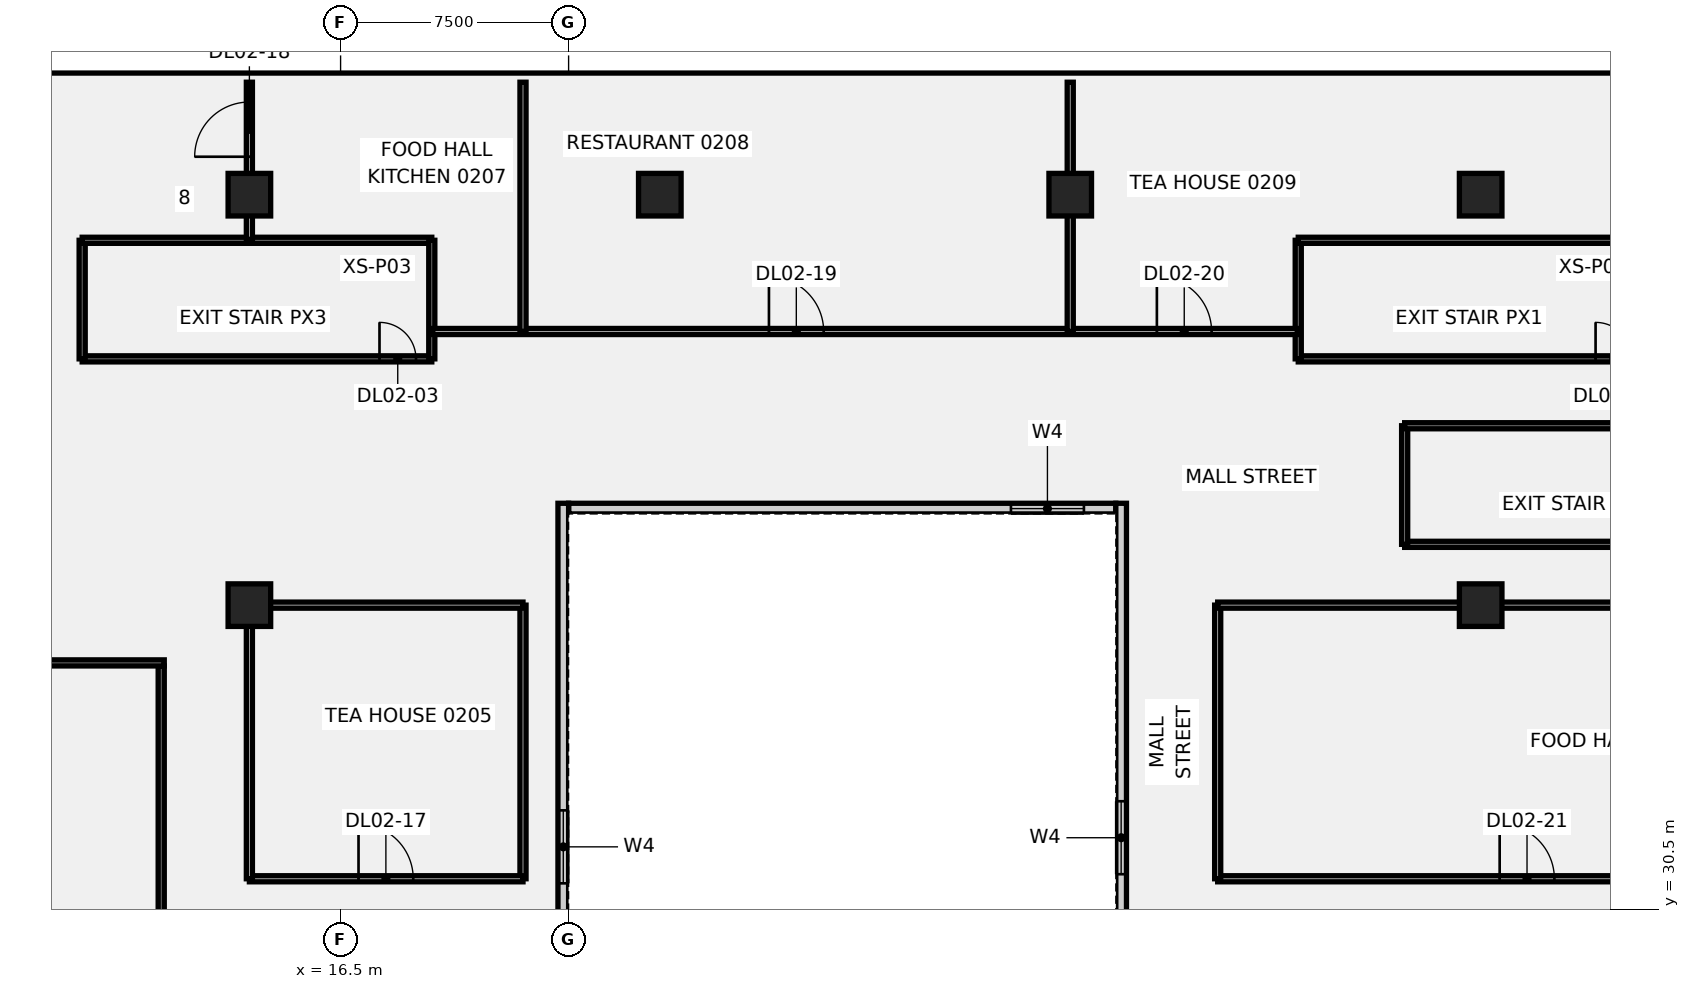
"""IFC4 building model, lengths in metres.
Left out: names, types, materials, properties, quantities, classifications, styles, units other than length and angle.
Written with IfcOpenShell. Run it as: python <this file> out.ifc"""

import sys

from ifc_helpers import new_model, si_unit, direction, frame, frame_2d, origin, origin_2d, place, context, subcontext, project, spatial, rectangle, extrude, element, fill, save


model = new_model("IFC4")
c1 = context("Model", 3, precision=1e-05, world=origin(), true_north=direction((0.0, 1.0)))
c2 = subcontext(c1, "Body", "Model", "MODEL_VIEW")
j1 = project(units=[si_unit("LENGTHUNIT", "METRE"), si_unit("PLANEANGLEUNIT", "RADIAN")], contexts=[c1])
p1 = place(None, origin())
s1 = spatial("IfcSite", under=j1, at=p1, CompositionType="ELEMENT")
p2 = place(p1, origin())
s2 = spatial("IfcBuilding", under=s1, at=p2, CompositionType="ELEMENT")
p3 = place(p2, frame((0.0, 0.0, 15.0)))
s3 = spatial("IfcBuildingStorey", under=s2, at=p3, CompositionType="ELEMENT", Elevation=15.0)
for number, where, z_axis, x_axis in (
    (1, (13.5, 40.5, -0.5), (0.0, 0.0, 1.0), (1.0, 0.0, 0.0)),
    (2, (13.5, 54.0, -0.5), (0.0, 0.0, 1.0), (1.0, 0.0, 0.0)),
    (3, (27.0, 54.0, -0.5), (0.0, 0.0, 1.0), (1.0, 0.0, 0.0)),
    (4, (40.5, 54.0, -0.5), (0.0, 0.0, 1.0), (1.0, 0.0, 0.0)),
    (5, (54.0, 40.5, -0.5), (0.0, 0.0, 1.0), (1.0, 0.0, 0.0)),
    (6, (54.0, 54.0, -0.5), (0.0, 0.0, 1.0), (1.0, 0.0, 0.0)),
):
    element("IfcColumn", number, at=place(p3, frame(where, z_axis=z_axis, x_axis=x_axis)), inside=s3, PredefinedType="COLUMN", context=c2, shape_type="SweptSolid", body=[
        extrude(rectangle(XDim=1.4, YDim=1.4, at=origin_2d()), origin(), (0.0, 0.0, 1.0), 5.0),
    ])
p4 = place(p3, frame((8.0, 48.6, 0.0), z_axis=(0.0, 0.0, 1.0), x_axis=(1.0, 0.0, 0.0)))
e7 = element("IfcWall", 7, at=p4, inside=s3, PredefinedType="PARTITIONING", context=c2, shape_type="SweptSolid", body=[
    extrude(rectangle(XDim=11.5, YDim=0.2, at=frame_2d((5.75, 0.0))), origin(), (0.0, 0.0, 1.0), 4.5),
])
p5 = place(p4, frame((9.78, 0.0, 0.0)))
e8 = element("IfcOpeningElement", 8, at=p5, cuts=e7, PredefinedType="OPENING", context=c2, shape_type="SweptSolid", body=[
    extrude(rectangle(XDim=1.2, YDim=2.1, at=frame_2d((0.6, 1.05))), frame((0.0, 0.11, 0.0), z_axis=(0.0, -1.0, 0.0), x_axis=(1.0, 0.0, 0.0)), (0.0, 0.0, 1.0), 0.22),
])
p6 = place(p3, frame((8.0, 48.6, 0.0), z_axis=(0.0, 0.0, 1.0), x_axis=(0.0, 1.0, 0.0)))
e9 = element("IfcWall", 9, at=p6, inside=s3, PredefinedType="PARTITIONING", context=c2, shape_type="SweptSolid", body=[
    extrude(rectangle(XDim=3.9, YDim=0.2, at=frame_2d((1.95, 0.0))), origin(), (0.0, 0.0, 1.0), 4.5),
])
p7 = place(p3, frame((8.0, 52.5, 0.0), z_axis=(0.0, 0.0, 1.0), x_axis=(1.0, 0.0, 0.0)))
e10 = element("IfcWall", 10, at=p7, inside=s3, PredefinedType="PARTITIONING", context=c2, shape_type="SweptSolid", body=[
    extrude(rectangle(XDim=11.5, YDim=0.2, at=frame_2d((5.75, 0.0))), origin(), (0.0, 0.0, 1.0), 4.5),
])
p8 = place(p3, frame((19.5, 48.6, 0.0), z_axis=(0.0, 0.0, 1.0), x_axis=(0.0, 1.0, 0.0)))
e11 = element("IfcWall", 11, at=p8, inside=s3, PredefinedType="PARTITIONING", context=c2, shape_type="SweptSolid", body=[
    extrude(rectangle(XDim=3.9, YDim=0.2, at=frame_2d((1.95, 0.0))), origin(), (0.0, 0.0, 1.0), 4.5),
])
p9 = place(p3, frame((48.0, 48.6, 0.0), z_axis=(0.0, 0.0, 1.0), x_axis=(1.0, 0.0, 0.0)))
e12 = element("IfcWall", 12, at=p9, inside=s3, PredefinedType="PARTITIONING", context=c2, shape_type="SweptSolid", body=[
    extrude(rectangle(XDim=11.5, YDim=0.2, at=frame_2d((5.75, 0.0))), origin(), (0.0, 0.0, 1.0), 4.5),
])
p10 = place(p9, frame((9.78, 0.0, 0.0)))
e13 = element("IfcOpeningElement", 13, at=p10, cuts=e12, PredefinedType="OPENING", context=c2, shape_type="SweptSolid", body=[
    extrude(rectangle(XDim=1.2, YDim=2.1, at=frame_2d((0.6, 1.05))), frame((0.0, 0.11, 0.0), z_axis=(0.0, -1.0, 0.0), x_axis=(1.0, 0.0, 0.0)), (0.0, 0.0, 1.0), 0.22),
])
p11 = place(p3, frame((48.0, 48.6, 0.0), z_axis=(0.0, 0.0, 1.0), x_axis=(0.0, 1.0, 0.0)))
e14 = element("IfcWall", 14, at=p11, inside=s3, PredefinedType="PARTITIONING", context=c2, shape_type="SweptSolid", body=[
    extrude(rectangle(XDim=3.9, YDim=0.2, at=frame_2d((1.95, 0.0))), origin(), (0.0, 0.0, 1.0), 4.5),
])
for number, where, z_axis, x_axis in (
    (15, (48.0, 52.5, 0.0), (0.0, 0.0, 1.0), (1.0, 0.0, 0.0)),
    (16, (51.5, 42.5, 0.0), (0.0, 0.0, 1.0), (1.0, 0.0, 0.0)),
):
    element("IfcWall", number, at=place(p3, frame(where, z_axis=z_axis, x_axis=x_axis)), inside=s3, PredefinedType="PARTITIONING", context=c2, shape_type="SweptSolid", body=[
        extrude(rectangle(XDim=11.5, YDim=0.2, at=frame_2d((5.75, 0.0))), origin(), (0.0, 0.0, 1.0), 4.5),
    ])
p12 = place(p3, frame((51.5, 42.5, 0.0), z_axis=(0.0, 0.0, 1.0), x_axis=(0.0, 1.0, 0.0)))
e17 = element("IfcWall", 17, at=p12, inside=s3, PredefinedType="PARTITIONING", context=c2, shape_type="SweptSolid", body=[
    extrude(rectangle(XDim=3.9, YDim=0.2, at=frame_2d((1.95, 0.0))), origin(), (0.0, 0.0, 1.0), 4.5),
])
p13 = place(p3, frame((51.5, 46.4, 0.0), z_axis=(0.0, 0.0, 1.0), x_axis=(1.0, 0.0, 0.0)))
e18 = element("IfcWall", 18, at=p13, inside=s3, PredefinedType="PARTITIONING", context=c2, shape_type="SweptSolid", body=[
    extrude(rectangle(XDim=11.5, YDim=0.2, at=frame_2d((5.75, 0.0))), origin(), (0.0, 0.0, 1.0), 4.5),
])
p14 = place(p3, frame((13.5, 52.53, 0.0), z_axis=(0.0, 0.0, 1.0), x_axis=(0.0, 1.0, 0.0)))
e19 = element("IfcWall", 19, at=p14, inside=s3, PredefinedType="PARTITIONING", context=c2, shape_type="SweptSolid", body=[
    extrude(rectangle(XDim=5.169, YDim=0.2, at=frame_2d((2.584, 0.0))), origin(), (0.0, 0.0, 1.0), 4.5),
])
p15 = place(p14, frame((2.718, 0.0, 0.0)))
e20 = element("IfcOpeningElement", 20, at=p15, cuts=e19, PredefinedType="OPENING", context=c2, shape_type="SweptSolid", body=[
    extrude(rectangle(XDim=1.8, YDim=2.1, at=frame_2d((0.9, 1.05))), frame((0.0, 0.11, 0.0), z_axis=(0.0, -1.0, 0.0), x_axis=(1.0, 0.0, 0.0)), (0.0, 0.0, 1.0), 0.22),
])
p16 = place(p3, frame((19.53, 49.5, 0.0), z_axis=(0.0, 0.0, 1.0), x_axis=(1.0, 0.0, 0.0)))
e21 = element("IfcWall", 21, at=p16, inside=s3, PredefinedType="PARTITIONING", context=c2, shape_type="SweptSolid", body=[
    extrude(rectangle(XDim=28.44, YDim=0.2, at=frame_2d((14.22, 0.0))), origin(), (0.0, 0.0, 1.0), 4.5),
])
p17 = place(p16, frame((11.06, 0.0, 0.0)))
e22 = element("IfcOpeningElement", 22, at=p17, cuts=e21, PredefinedType="OPENING", context=c2, shape_type="SweptSolid", body=[
    extrude(rectangle(XDim=1.8, YDim=2.1, at=frame_2d((0.9, 1.05))), frame((0.0, 0.11, 0.0), z_axis=(0.0, -1.0, 0.0), x_axis=(1.0, 0.0, 0.0)), (0.0, 0.0, 1.0), 0.22),
])
p18 = place(p16, frame((23.82, 0.0, 0.0)))
e23 = element("IfcOpeningElement", 23, at=p18, cuts=e21, PredefinedType="OPENING", context=c2, shape_type="SweptSolid", body=[
    extrude(rectangle(XDim=1.8, YDim=2.1, at=frame_2d((0.9, 1.05))), frame((0.0, 0.11, 0.0), z_axis=(0.0, -1.0, 0.0), x_axis=(1.0, 0.0, 0.0)), (0.0, 0.0, 1.0), 0.22),
])
for number, where, z_axis, x_axis in (
    (24, (22.5, 49.5, 0.0), (0.0, 0.0, 1.0), (0.0, 1.0, 0.0)),
    (25, (40.5, 49.5, 0.0), (0.0, 0.0, 1.0), (0.0, 1.0, 0.0)),
):
    element("IfcWall", number, at=place(p3, frame(where, z_axis=z_axis, x_axis=x_axis)), inside=s3, PredefinedType="PARTITIONING", context=c2, shape_type="SweptSolid", body=[
        extrude(rectangle(XDim=8.199, YDim=0.2, at=frame_2d((4.1, 0.0))), origin(), (0.0, 0.0, 1.0), 4.5),
    ])
p19 = place(p3, frame((45.35, 31.5, 0.0), z_axis=(0.0, 0.0, 1.0), x_axis=(1.0, 0.0, 0.0)))
e26 = element("IfcWall", 26, at=p19, inside=s3, PredefinedType="PARTITIONING", context=c2, shape_type="SweptSolid", body=[
    extrude(rectangle(XDim=20.349, YDim=0.2, at=frame_2d((10.174, 0.0))), origin(), (0.0, 0.0, 1.0), 4.5),
])
p20 = place(p19, frame((9.275, 0.0, 0.0)))
e27 = element("IfcOpeningElement", 27, at=p20, cuts=e26, PredefinedType="OPENING", context=c2, shape_type="SweptSolid", body=[
    extrude(rectangle(XDim=1.8, YDim=2.1, at=frame_2d((0.9, 1.05))), frame((0.0, 0.11, 0.0), z_axis=(0.0, -1.0, 0.0), x_axis=(1.0, 0.0, 0.0)), (0.0, 0.0, 1.0), 0.22),
])
p21 = place(p3, frame((45.35, 31.5, 0.0), z_axis=(0.0, 0.0, 1.0), x_axis=(0.0, 1.0, 0.0)))
e28 = element("IfcWall", 28, at=p21, inside=s3, PredefinedType="PARTITIONING", context=c2, shape_type="SweptSolid", body=[
    extrude(rectangle(XDim=9.0, YDim=0.2, at=frame_2d((4.5, 0.0))), origin(), (0.0, 0.0, 1.0), 4.5),
])
p22 = place(p3, frame((45.35, 40.5, 0.0), z_axis=(0.0, 0.0, 1.0), x_axis=(1.0, 0.0, 0.0)))
e29 = element("IfcWall", 29, at=p22, inside=s3, PredefinedType="PARTITIONING", context=c2, shape_type="SweptSolid", body=[
    extrude(rectangle(XDim=20.349, YDim=0.2, at=frame_2d((10.174, 0.0))), origin(), (0.0, 0.0, 1.0), 4.5),
])
p23 = place(p3, frame((22.5, 31.5, 0.0), z_axis=(0.0, 0.0, 1.0), x_axis=(0.0, 1.0, 0.0)))
e30 = element("IfcWall", 30, at=p23, inside=s3, PredefinedType="PARTITIONING", context=c2, shape_type="SweptSolid", body=[
    extrude(rectangle(XDim=9.0, YDim=0.2, at=frame_2d((4.5, 0.0))), origin(), (0.0, 0.0, 1.0), 4.5),
])
p24 = place(p3, frame((13.5, 31.5, 0.0), z_axis=(0.0, 0.0, 1.0), x_axis=(1.0, 0.0, 0.0)))
e31 = element("IfcWall", 31, at=p24, inside=s3, PredefinedType="PARTITIONING", context=c2, shape_type="SweptSolid", body=[
    extrude(rectangle(XDim=9.0, YDim=0.2, at=frame_2d((4.5, 0.0))), origin(), (0.0, 0.0, 1.0), 4.5),
])
p25 = place(p24, frame((3.59, 0.0, 0.0)))
e32 = element("IfcOpeningElement", 32, at=p25, cuts=e31, PredefinedType="OPENING", context=c2, shape_type="SweptSolid", body=[
    extrude(rectangle(XDim=1.8, YDim=2.1, at=frame_2d((0.9, 1.05))), frame((0.0, 0.11, 0.0), z_axis=(0.0, -1.0, 0.0), x_axis=(1.0, 0.0, 0.0)), (0.0, 0.0, 1.0), 0.22),
])
for number, where, z_axis, x_axis in (
    (33, (13.5, 31.5, 0.0), (0.0, 0.0, 1.0), (0.0, 1.0, 0.0)),
    (34, (13.5, 40.5, 0.0), (0.0, 0.0, 1.0), (1.0, 0.0, 0.0)),
):
    element("IfcWall", number, at=place(p3, frame(where, z_axis=z_axis, x_axis=x_axis)), inside=s3, PredefinedType="PARTITIONING", context=c2, shape_type="SweptSolid", body=[
        extrude(rectangle(XDim=9.0, YDim=0.2, at=frame_2d((4.5, 0.0))), origin(), (0.0, 0.0, 1.0), 4.5),
    ])
p26 = place(p3, frame((10.6, 28.8, 0.0), z_axis=(0.0, 0.0, 1.0), x_axis=(0.0, 1.0, 0.0)))
e35 = element("IfcWall", 35, at=p26, inside=s3, PredefinedType="SOLIDWALL", context=c2, shape_type="SweptSolid", body=[
    extrude(rectangle(XDim=9.7, YDim=0.2, at=frame_2d((4.85, 0.0))), origin(), (0.0, 0.0, 1.0), 4.5),
])
p27 = place(p3, frame((10.7, 38.6, 0.0), z_axis=(0.0, 0.0, 1.0), x_axis=(-1.0, 0.0, 0.0)))
e36 = element("IfcWall", 36, at=p27, inside=s3, PredefinedType="SOLIDWALL", context=c2, shape_type="SweptSolid", body=[
    extrude(rectangle(XDim=4.3, YDim=0.2, at=frame_2d((2.15, 0.0))), origin(), (0.0, 0.0, 1.0), 4.5),
])
p28 = place(p3, frame((24.0, 43.675, 0.0), z_axis=(0.0, 0.0, 1.0), x_axis=(1.0, 0.0, 0.0)))
e37 = element("IfcWall", 37, at=p28, inside=s3, PredefinedType="SOLIDWALL", context=c2, shape_type="SweptSolid", body=[
    extrude(rectangle(XDim=18.0, YDim=0.35, at=frame_2d((9.0, 0.0))), origin(), (0.0, 0.0, 1.0), 4.5),
])
p29 = place(p28, frame((14.55, 0.0, 1.0)))
e38 = element("IfcOpeningElement", 38, at=p29, cuts=e37, PredefinedType="OPENING", context=c2, shape_type="SweptSolid", body=[
    extrude(rectangle(XDim=2.4, YDim=1.8, at=frame_2d((1.2, 0.9))), frame((0.0, 0.185, 0.0), z_axis=(0.0, -1.0, 0.0), x_axis=(1.0, 0.0, 0.0)), (0.0, 0.0, 1.0), 0.37),
])
p30 = place(p3, frame((23.825, 16.45, 0.0), z_axis=(0.0, 0.0, 1.0), x_axis=(0.0, 1.0, 0.0)))
e39 = element("IfcWall", 39, at=p30, inside=s3, PredefinedType="SOLIDWALL", context=c2, shape_type="SweptSolid", body=[
    extrude(rectangle(XDim=27.4, YDim=0.35, at=frame_2d((13.7, 0.0))), origin(), (0.0, 0.0, 1.0), 4.5),
])
p31 = place(p30, frame((14.9, 0.0, 1.0)))
e40 = element("IfcOpeningElement", 40, at=p31, cuts=e39, PredefinedType="OPENING", context=c2, shape_type="SweptSolid", body=[
    extrude(rectangle(XDim=2.4, YDim=1.8, at=frame_2d((1.2, 0.9))), frame((0.0, 0.185, 0.0), z_axis=(0.0, -1.0, 0.0), x_axis=(1.0, 0.0, 0.0)), (0.0, 0.0, 1.0), 0.37),
])
p32 = place(p3, frame((42.175, 16.45, 0.0), z_axis=(0.0, 0.0, 1.0), x_axis=(0.0, 1.0, 0.0)))
e41 = element("IfcWall", 41, at=p32, inside=s3, PredefinedType="SOLIDWALL", context=c2, shape_type="SweptSolid", body=[
    extrude(rectangle(XDim=27.4, YDim=0.35, at=frame_2d((13.7, 0.0))), origin(), (0.0, 0.0, 1.0), 4.5),
])
p33 = place(p32, frame((15.2, 0.0, 1.0)))
e42 = element("IfcOpeningElement", 42, at=p33, cuts=e41, PredefinedType="OPENING", context=c2, shape_type="SweptSolid", body=[
    extrude(rectangle(XDim=2.4, YDim=1.8, at=frame_2d((1.2, 0.9))), frame((0.0, 0.185, 0.0), z_axis=(0.0, -1.0, 0.0), x_axis=(1.0, 0.0, 0.0)), (0.0, 0.0, 1.0), 0.37),
])
p34 = place(p10, origin())
e43 = element("IfcDoor", 43, at=p34, inside=s3, OperationType="SINGLE_SWING_LEFT", PredefinedType="DOOR", context=c2, shape_type="SweptSolid", body=[
    extrude(rectangle(XDim=1.2, YDim=2.1, at=frame_2d((0.6, 1.05))), frame((0.0, 0.025, 0.0), z_axis=(0.0, -1.0, 0.0), x_axis=(1.0, 0.0, 0.0)), (0.0, 0.0, 1.0), 0.05),
])
fill(e13, e43)
p35 = place(p5, origin())
e44 = element("IfcDoor", 44, at=p35, inside=s3, OperationType="SINGLE_SWING_LEFT", PredefinedType="DOOR", context=c2, shape_type="SweptSolid", body=[
    extrude(rectangle(XDim=1.2, YDim=2.1, at=frame_2d((0.6, 1.05))), frame((0.0, 0.025, 0.0), z_axis=(0.0, -1.0, 0.0), x_axis=(1.0, 0.0, 0.0)), (0.0, 0.0, 1.0), 0.05),
])
fill(e8, e44)
p36 = place(p25, origin())
e45 = element("IfcDoor", 45, at=p36, inside=s3, OperationType="SINGLE_SWING_LEFT", PredefinedType="DOOR", context=c2, shape_type="SweptSolid", body=[
    extrude(rectangle(XDim=1.8, YDim=2.1, at=frame_2d((0.9, 1.05))), frame((0.0, 0.025, 0.0), z_axis=(0.0, -1.0, 0.0), x_axis=(1.0, 0.0, 0.0)), (0.0, 0.0, 1.0), 0.05),
])
fill(e32, e45)
p37 = place(p15, origin())
e46 = element("IfcDoor", 46, at=p37, inside=s3, OperationType="SINGLE_SWING_RIGHT", PredefinedType="DOOR", context=c2, shape_type="SweptSolid", body=[
    extrude(rectangle(XDim=1.8, YDim=2.1, at=frame_2d((0.9, 1.05))), frame((0.0, 0.025, 0.0), z_axis=(0.0, -1.0, 0.0), x_axis=(1.0, 0.0, 0.0)), (0.0, 0.0, 1.0), 0.05),
])
fill(e20, e46)
p38 = place(p17, origin())
e47 = element("IfcDoor", 47, at=p38, inside=s3, OperationType="SINGLE_SWING_LEFT", PredefinedType="DOOR", context=c2, shape_type="SweptSolid", body=[
    extrude(rectangle(XDim=1.8, YDim=2.1, at=frame_2d((0.9, 1.05))), frame((0.0, 0.025, 0.0), z_axis=(0.0, -1.0, 0.0), x_axis=(1.0, 0.0, 0.0)), (0.0, 0.0, 1.0), 0.05),
])
fill(e22, e47)
p39 = place(p18, origin())
e48 = element("IfcDoor", 48, at=p39, inside=s3, OperationType="SINGLE_SWING_RIGHT", PredefinedType="DOOR", context=c2, shape_type="SweptSolid", body=[
    extrude(rectangle(XDim=1.8, YDim=2.1, at=frame_2d((0.9, 1.05))), frame((0.0, 0.025, 0.0), z_axis=(0.0, -1.0, 0.0), x_axis=(1.0, 0.0, 0.0)), (0.0, 0.0, 1.0), 0.05),
])
fill(e23, e48)
p40 = place(p20, origin())
e49 = element("IfcDoor", 49, at=p40, inside=s3, OperationType="SINGLE_SWING_LEFT", PredefinedType="DOOR", context=c2, shape_type="SweptSolid", body=[
    extrude(rectangle(XDim=1.8, YDim=2.1, at=frame_2d((0.9, 1.05))), frame((0.0, 0.025, 0.0), z_axis=(0.0, -1.0, 0.0), x_axis=(1.0, 0.0, 0.0)), (0.0, 0.0, 1.0), 0.05),
])
fill(e27, e49)
p41 = place(p29, origin())
e50 = element("IfcWindow", 50, at=p41, inside=s3, PartitioningType="SINGLE_PANEL", PredefinedType="WINDOW", context=c2, shape_type="SweptSolid", body=[
    extrude(rectangle(XDim=2.4, YDim=1.8, at=frame_2d((1.2, 0.9))), frame((0.0, 0.03, 0.0), z_axis=(0.0, -1.0, 0.0), x_axis=(1.0, 0.0, 0.0)), (0.0, 0.0, 1.0), 0.06),
])
fill(e38, e50)
p42 = place(p31, origin())
e51 = element("IfcWindow", 51, at=p42, inside=s3, PartitioningType="SINGLE_PANEL", PredefinedType="WINDOW", context=c2, shape_type="SweptSolid", body=[
    extrude(rectangle(XDim=2.4, YDim=1.8, at=frame_2d((1.2, 0.9))), frame((0.0, 0.03, 0.0), z_axis=(0.0, -1.0, 0.0), x_axis=(1.0, 0.0, 0.0)), (0.0, 0.0, 1.0), 0.06),
])
fill(e40, e51)
p43 = place(p33, origin())
e52 = element("IfcWindow", 52, at=p43, inside=s3, PartitioningType="SINGLE_PANEL", PredefinedType="WINDOW", context=c2, shape_type="SweptSolid", body=[
    extrude(rectangle(XDim=2.4, YDim=1.8, at=frame_2d((1.2, 0.9))), frame((0.0, 0.03, 0.0), z_axis=(0.0, -1.0, 0.0), x_axis=(1.0, 0.0, 0.0)), (0.0, 0.0, 1.0), 0.06),
])
fill(e42, e52)
save(model, sys.argv[1])
